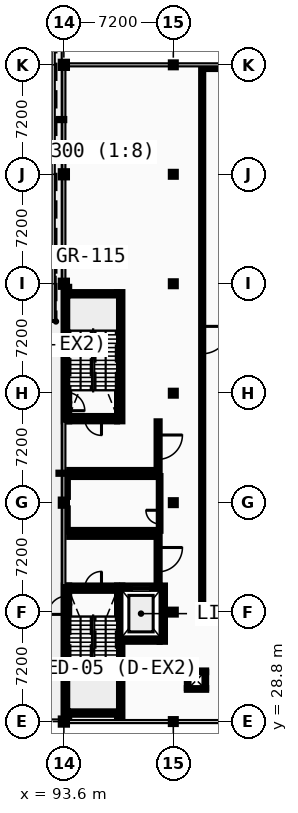
"""IFC4 building model, lengths in metres.
Left out: names, types, materials, properties, quantities, classifications, styles, units other than length and angle.
Written with IfcOpenShell. Run it as: python <this file> out.ifc"""

import sys

from ifc_helpers import new_model, si_unit, direction, frame, frame_2d, origin, origin_2d, place, context, subcontext, project, spatial, rectangle, hollow_circle, extrude, element, fill, save


model = new_model("IFC4")
c1 = context("Model", 3, precision=1e-05, world=origin(), true_north=direction((0.0, 1.0)))
c2 = subcontext(c1, "Body", "Model", "MODEL_VIEW")
j1 = project(units=[si_unit("LENGTHUNIT", "METRE"), si_unit("PLANEANGLEUNIT", "RADIAN")], contexts=[c1])
p1 = place(None, origin())
s1 = spatial("IfcSite", under=j1, at=p1, CompositionType="ELEMENT")
p2 = place(p1, origin())
s2 = spatial("IfcBuilding", under=s1, at=p2, CompositionType="ELEMENT")
p3 = place(p2, origin())
s3 = spatial("IfcBuildingStorey", under=s2, at=p3, CompositionType="ELEMENT", Elevation=0.0)
for number, where, z_axis, x_axis in (
    (1, (93.6, 28.8, 0.0), (0.0, 0.0, 1.0), (1.0, 0.0, 0.0)),
    (2, (93.6, 43.2, 0.0), (0.0, 0.0, 1.0), (1.0, 0.0, 0.0)),
    (3, (93.6, 57.6, 0.0), (0.0, 0.0, 1.0), (1.0, 0.0, 0.0)),
    (4, (93.6, 64.8, 0.0), (0.0, 0.0, 1.0), (1.0, 0.0, 0.0)),
    (5, (93.6, 72.0, 0.0), (0.0, 0.0, 1.0), (1.0, 0.0, 0.0)),
):
    element("IfcColumn", number, at=place(p3, frame(where, z_axis=z_axis, x_axis=x_axis)), inside=s3, PredefinedType="COLUMN", context=c2, shape_type="SweptSolid", body=[
        extrude(hollow_circle(Radius=0.203, WallThickness=0.016, at=origin_2d()), origin(), (0.0, 0.0, 1.0), 5.2),
    ])
for number, where, z_axis, x_axis in (
    (6, (100.8, 28.8, 0.0), (0.0, 0.0, 1.0), (1.0, 0.0, 0.0)),
    (7, (100.8, 36.0, 0.0), (0.0, 0.0, 1.0), (1.0, 0.0, 0.0)),
    (8, (100.8, 43.2, 0.0), (0.0, 0.0, 1.0), (1.0, 0.0, 0.0)),
    (9, (100.8, 50.4, 0.0), (0.0, 0.0, 1.0), (1.0, 0.0, 0.0)),
    (10, (100.8, 57.6, 0.0), (0.0, 0.0, 1.0), (1.0, 0.0, 0.0)),
    (11, (100.8, 64.8, 0.0), (0.0, 0.0, 1.0), (1.0, 0.0, 0.0)),
    (12, (100.8, 72.0, 0.0), (0.0, 0.0, 1.0), (1.0, 0.0, 0.0)),
):
    element("IfcColumn", number, at=place(p3, frame(where, z_axis=z_axis, x_axis=x_axis)), inside=s3, PredefinedType="COLUMN", context=c2, shape_type="SweptSolid", body=[
        extrude(hollow_circle(Radius=0.162, WallThickness=0.012, at=origin_2d()), origin(), (0.0, 0.0, 1.0), 5.2),
    ])
p4 = place(p3, frame((93.95, 29.425, 0.0), z_axis=(0.0, 0.0, 1.0), x_axis=(1.0, 0.0, 0.0)))
e13 = element("IfcWall", 13, at=p4, inside=s3, PredefinedType="SHEAR", context=c2, shape_type="SweptSolid", body=[
    extrude(rectangle(XDim=3.15, YDim=0.35, at=frame_2d((1.575, 0.0))), origin(), (0.0, 0.0, 1.0), 4.97),
])
p5 = place(p3, frame((93.95, 37.575, 0.0), z_axis=(0.0, 0.0, 1.0), x_axis=(1.0, 0.0, 0.0)))
e14 = element("IfcWall", 14, at=p5, inside=s3, PredefinedType="SHEAR", context=c2, shape_type="SweptSolid", body=[
    extrude(rectangle(XDim=3.15, YDim=0.35, at=frame_2d((1.575, 0.0))), origin(), (0.0, 0.0, 1.0), 4.97),
])
p6 = place(p5, frame((1.025, 0.0, 0.0)))
e15 = element("IfcOpeningElement", 15, at=p6, cuts=e14, PredefinedType="OPENING", context=c2, shape_type="SweptSolid", body=[
    extrude(rectangle(XDim=1.1, YDim=2.15, at=frame_2d((0.55, 1.075))), frame((0.0, 0.185, 0.0), z_axis=(0.0, -1.0, 0.0), x_axis=(1.0, 0.0, 0.0)), (0.0, 0.0, 1.0), 0.37),
])
p7 = place(p3, frame((93.775, 29.0, 0.0), z_axis=(0.0, 0.0, 1.0), x_axis=(0.0, 1.0, 0.0)))
e16 = element("IfcWall", 16, at=p7, inside=s3, PredefinedType="SHEAR", context=c2, shape_type="SweptSolid", body=[
    extrude(rectangle(XDim=8.75, YDim=0.35, at=frame_2d((4.375, 0.0))), origin(), (0.0, 0.0, 1.0), 4.97),
])
p8 = place(p7, frame((6.85, 0.0, 0.0)))
e17 = element("IfcOpeningElement", 17, at=p8, cuts=e16, PredefinedType="OPENING", context=c2, shape_type="SweptSolid", body=[
    extrude(rectangle(XDim=1.2, YDim=2.15, at=frame_2d((0.6, 1.075))), frame((0.0, 0.185, 0.0), z_axis=(0.0, -1.0, 0.0), x_axis=(1.0, 0.0, 0.0)), (0.0, 0.0, 1.0), 0.37),
])
p9 = place(p3, frame((97.275, 29.0, 0.0), z_axis=(0.0, 0.0, 1.0), x_axis=(0.0, 1.0, 0.0)))
e18 = element("IfcWall", 18, at=p9, inside=s3, PredefinedType="SHEAR", context=c2, shape_type="SweptSolid", body=[
    extrude(rectangle(XDim=8.75, YDim=0.35, at=frame_2d((4.375, 0.0))), origin(), (0.0, 0.0, 1.0), 4.97),
])
p10 = place(p3, frame((97.45, 34.225, 0.0), z_axis=(0.0, 0.0, 1.0), x_axis=(1.0, 0.0, 0.0)))
e19 = element("IfcWall", 19, at=p10, inside=s3, PredefinedType="SHEAR", context=c2, shape_type="SweptSolid", body=[
    extrude(rectangle(XDim=2.45, YDim=0.35, at=frame_2d((1.225, 0.0))), origin(), (0.0, 0.0, 1.0), 4.97),
])
p11 = place(p3, frame((97.45, 37.575, 0.0), z_axis=(0.0, 0.0, 1.0), x_axis=(1.0, 0.0, 0.0)))
e20 = element("IfcWall", 20, at=p11, inside=s3, PredefinedType="SHEAR", context=c2, shape_type="SweptSolid", body=[
    extrude(rectangle(XDim=2.45, YDim=0.35, at=frame_2d((1.225, 0.0))), origin(), (0.0, 0.0, 1.0), 4.97),
])
p12 = place(p11, frame((0.625, 0.0, 0.0)))
e21 = element("IfcOpeningElement", 21, at=p12, cuts=e20, PredefinedType="OPENING", context=c2, shape_type="SweptSolid", body=[
    extrude(rectangle(XDim=1.2, YDim=2.2, at=frame_2d((0.6, 1.1))), frame((0.0, 0.185, 0.0), z_axis=(0.0, -1.0, 0.0), x_axis=(1.0, 0.0, 0.0)), (0.0, 0.0, 1.0), 0.37),
])
p13 = place(p3, frame((100.075, 34.05, 0.0), z_axis=(0.0, 0.0, 1.0), x_axis=(0.0, 1.0, 0.0)))
e22 = element("IfcWall", 22, at=p13, inside=s3, PredefinedType="SHEAR", context=c2, shape_type="SweptSolid", body=[
    extrude(rectangle(XDim=3.7, YDim=0.35, at=frame_2d((1.85, 0.0))), origin(), (0.0, 0.0, 1.0), 4.97),
])
p14 = place(p3, frame((99.8, 37.75, 0.0), z_axis=(0.0, 0.0, 1.0), x_axis=(0.0, 1.0, 0.0)))
e23 = element("IfcWall", 23, at=p14, inside=s3, PredefinedType="PARTITIONING", context=c2, shape_type="SweptSolid", body=[
    extrude(rectangle(XDim=3.4, YDim=0.2, at=frame_2d((1.7, 0.0))), origin(), (0.0, 0.0, 1.0), 4.97),
])
p15 = place(p14, frame((0.9, 0.0, 0.0)))
e24 = element("IfcOpeningElement", 24, at=p15, cuts=e23, PredefinedType="OPENING", context=c2, shape_type="SweptSolid", body=[
    extrude(rectangle(XDim=1.6, YDim=2.2, at=frame_2d((0.8, 1.1))), frame((0.0, 0.11, 0.0), z_axis=(0.0, -1.0, 0.0), x_axis=(1.0, 0.0, 0.0)), (0.0, 0.0, 1.0), 0.22),
])
p16 = place(p3, frame((93.95, 41.05, 0.0), z_axis=(0.0, 0.0, 1.0), x_axis=(1.0, 0.0, 0.0)))
e25 = element("IfcWall", 25, at=p16, inside=s3, PredefinedType="PARTITIONING", context=c2, shape_type="SweptSolid", body=[
    extrude(rectangle(XDim=5.75, YDim=0.2, at=frame_2d((2.875, 0.0))), origin(), (0.0, 0.0, 1.0), 4.97),
])
p17 = place(p3, frame((93.95, 48.725, 0.0), z_axis=(0.0, 0.0, 1.0), x_axis=(1.0, 0.0, 0.0)))
e26 = element("IfcWall", 26, at=p17, inside=s3, PredefinedType="SHEAR", context=c2, shape_type="SweptSolid", body=[
    extrude(rectangle(XDim=3.15, YDim=0.35, at=frame_2d((1.575, 0.0))), origin(), (0.0, 0.0, 1.0), 4.97),
])
p18 = place(p17, frame((1.025, 0.0, 0.0)))
e27 = element("IfcOpeningElement", 27, at=p18, cuts=e26, PredefinedType="OPENING", context=c2, shape_type="SweptSolid", body=[
    extrude(rectangle(XDim=1.1, YDim=2.15, at=frame_2d((0.55, 1.075))), frame((0.0, 0.185, 0.0), z_axis=(0.0, -1.0, 0.0), x_axis=(1.0, 0.0, 0.0)), (0.0, 0.0, 1.0), 0.37),
])
p19 = place(p3, frame((93.95, 56.875, 0.0), z_axis=(0.0, 0.0, 1.0), x_axis=(1.0, 0.0, 0.0)))
e28 = element("IfcWall", 28, at=p19, inside=s3, PredefinedType="SHEAR", context=c2, shape_type="SweptSolid", body=[
    extrude(rectangle(XDim=3.15, YDim=0.35, at=frame_2d((1.575, 0.0))), origin(), (0.0, 0.0, 1.0), 4.97),
])
p20 = place(p3, frame((93.775, 48.55, 0.0), z_axis=(0.0, 0.0, 1.0), x_axis=(0.0, 1.0, 0.0)))
e29 = element("IfcWall", 29, at=p20, inside=s3, PredefinedType="SHEAR", context=c2, shape_type="SweptSolid", body=[
    extrude(rectangle(XDim=8.847, YDim=0.35, at=frame_2d((4.423, 0.0))), origin(), (0.0, 0.0, 1.0), 4.97),
])
p21 = place(p20, frame((0.7, 0.0, 0.0)))
e30 = element("IfcOpeningElement", 30, at=p21, cuts=e29, PredefinedType="OPENING", context=c2, shape_type="SweptSolid", body=[
    extrude(rectangle(XDim=1.2, YDim=2.15, at=frame_2d((0.6, 1.075))), frame((0.0, 0.185, 0.0), z_axis=(0.0, -1.0, 0.0), x_axis=(1.0, 0.0, 0.0)), (0.0, 0.0, 1.0), 0.37),
])
p22 = place(p3, frame((97.275, 48.55, 0.0), z_axis=(0.0, 0.0, 1.0), x_axis=(0.0, 1.0, 0.0)))
e31 = element("IfcWall", 31, at=p22, inside=s3, PredefinedType="SHEAR", context=c2, shape_type="SweptSolid", body=[
    extrude(rectangle(XDim=8.5, YDim=0.35, at=frame_2d((4.25, 0.0))), origin(), (0.0, 0.0, 1.0), 4.97),
])
p23 = place(p3, frame((99.8, 45.15, 0.0), z_axis=(0.0, 0.0, 1.0), x_axis=(0.0, 1.0, 0.0)))
e32 = element("IfcWall", 32, at=p23, inside=s3, PredefinedType="PARTITIONING", context=c2, shape_type="SweptSolid", body=[
    extrude(rectangle(XDim=3.4, YDim=0.2, at=frame_2d((1.7, 0.0))), origin(), (0.0, 0.0, 1.0), 4.97),
])
p24 = place(p23, frame((0.9, 0.0, 0.0)))
e33 = element("IfcOpeningElement", 33, at=p24, cuts=e32, PredefinedType="OPENING", context=c2, shape_type="SweptSolid", body=[
    extrude(rectangle(XDim=1.6, YDim=2.2, at=frame_2d((0.8, 1.1))), frame((0.0, 0.11, 0.0), z_axis=(0.0, -1.0, 0.0), x_axis=(1.0, 0.0, 0.0)), (0.0, 0.0, 1.0), 0.22),
])
p25 = place(p3, frame((93.95, 45.25, 0.0), z_axis=(0.0, 0.0, 1.0), x_axis=(1.0, 0.0, 0.0)))
e34 = element("IfcWall", 34, at=p25, inside=s3, PredefinedType="PARTITIONING", context=c2, shape_type="SweptSolid", body=[
    extrude(rectangle(XDim=5.75, YDim=0.2, at=frame_2d((2.875, 0.0))), origin(), (0.0, 0.0, 1.0), 4.97),
])
for number, where, z_axis, x_axis in (
    (35, (101.69, 30.945, 0.0), (0.0, 0.0, 1.0), (1.0, 0.0, 0.0)),
    (36, (101.69, 32.105, 0.0), (0.0, 0.0, 1.0), (1.0, 0.0, 0.0)),
):
    element("IfcWall", number, at=place(p3, frame(where, z_axis=z_axis, x_axis=x_axis)), inside=s3, PredefinedType="PARTITIONING", context=c2, shape_type="SweptSolid", body=[
        extrude(rectangle(XDim=1.27, YDim=0.11, at=frame_2d((0.635, 0.0))), origin(), (0.0, 0.0, 1.0), 4.97),
    ])
for number, where, z_axis, x_axis in (
    (37, (101.745, 31.0, 0.0), (0.0, 0.0, 1.0), (0.0, 1.0, 0.0)),
    (38, (102.905, 31.0, 0.0), (0.0, 0.0, 1.0), (0.0, 1.0, 0.0)),
):
    element("IfcWall", number, at=place(p3, frame(where, z_axis=z_axis, x_axis=x_axis)), inside=s3, PredefinedType="PARTITIONING", context=c2, shape_type="SweptSolid", body=[
        extrude(rectangle(XDim=1.05, YDim=0.11, at=frame_2d((0.525, 0.0))), origin(), (0.0, 0.0, 1.0), 4.97),
    ])
p26 = place(p3, frame((102.7, 36.0, 0.0), z_axis=(0.0, 0.0, 1.0), x_axis=(1.0, 0.0, 0.0)))
e39 = element("IfcWall", 39, at=p26, inside=s3, PredefinedType="PARTITIONING", context=c2, shape_type="SweptSolid", body=[
    extrude(rectangle(XDim=4.92, YDim=0.135, at=frame_2d((2.46, 0.0))), origin(), (0.0, 0.0, 1.0), 4.665),
])
p27 = place(p3, frame((93.8, 41.35, 0.0), z_axis=(0.0, 0.0, 1.0), x_axis=(1.0, 0.0, 0.0)))
e40 = element("IfcWall", 40, at=p27, inside=s3, PredefinedType="PARTITIONING", context=c2, shape_type="SweptSolid", body=[
    extrude(rectangle(XDim=5.88, YDim=0.11, at=frame_2d((2.94, 0.0))), origin(), (0.0, 0.0, 1.0), 4.97),
])
p28 = place(p3, frame((93.8, 44.95, 0.0), z_axis=(0.0, 0.0, 1.0), x_axis=(1.0, 0.0, 0.0)))
e41 = element("IfcWall", 41, at=p28, inside=s3, PredefinedType="PARTITIONING", context=c2, shape_type="SweptSolid", body=[
    extrude(rectangle(XDim=5.88, YDim=0.125, at=frame_2d((2.94, 0.0))), origin(), (0.0, 0.0, 1.0), 4.97),
])
p29 = place(p3, frame((102.7, 71.8, 0.0), z_axis=(0.0, 0.0, 1.0), x_axis=(1.0, 0.0, 0.0)))
e42 = element("IfcWall", 42, at=p29, inside=s3, PredefinedType="PARTITIONING", context=c2, shape_type="SweptSolid", body=[
    extrude(rectangle(XDim=4.92, YDim=0.15, at=frame_2d((2.46, 0.0))), origin(), (0.0, 0.0, 1.0), 4.665),
])
p30 = place(p3, frame((93.8, 41.405, 0.0), z_axis=(0.0, 0.0, 1.0), x_axis=(0.0, 1.0, 0.0)))
e43 = element("IfcWall", 43, at=p30, inside=s3, PredefinedType="PARTITIONING", context=c2, shape_type="SweptSolid", body=[
    extrude(rectangle(XDim=1.415, YDim=0.11, at=frame_2d((0.708, 0.0))), origin(), (0.0, 0.0, 1.0), 4.97),
])
p31 = place(p3, frame((93.8, 43.58, 0.0), z_axis=(0.0, 0.0, 1.0), x_axis=(0.0, 1.0, 0.0)))
e44 = element("IfcWall", 44, at=p31, inside=s3, PredefinedType="PARTITIONING", context=c2, shape_type="SweptSolid", body=[
    extrude(rectangle(XDim=1.307, YDim=0.125, at=frame_2d((0.654, 0.0))), origin(), (0.0, 0.0, 1.0), 4.97),
])
p32 = place(p3, frame((99.9, 41.35, 0.0), z_axis=(0.0, 0.0, 1.0), x_axis=(0.0, 1.0, 0.0)))
e45 = element("IfcWall", 45, at=p32, inside=s3, PredefinedType="PARTITIONING", context=c2, shape_type="SweptSolid", body=[
    extrude(rectangle(XDim=3.6, YDim=0.11, at=frame_2d((1.8, 0.0))), origin(), (0.0, 0.0, 1.0), 4.97),
])
p33 = place(p32, frame((0.45, 0.0, 0.0)))
e46 = element("IfcOpeningElement", 46, at=p33, cuts=e45, PredefinedType="OPENING", context=c2, shape_type="SweptSolid", body=[
    extrude(rectangle(XDim=0.9, YDim=2.1, at=frame_2d((0.45, 1.05))), frame((0.0, 0.065, 0.0), z_axis=(0.0, -1.0, 0.0), x_axis=(1.0, 0.0, 0.0)), (0.0, 0.0, 1.0), 0.13),
])
p34 = place(p3, frame((102.7, 36.067, 0.0), z_axis=(0.0, 0.0, 1.0), x_axis=(0.0, 1.0, 0.0)))
e47 = element("IfcWall", 47, at=p34, inside=s3, PredefinedType="PARTITIONING", context=c2, shape_type="SweptSolid", body=[
    extrude(rectangle(XDim=35.658, YDim=0.135, at=frame_2d((17.829, 0.0))), origin(), (0.0, 0.0, 1.0), 4.97),
])
p35 = place(p34, frame((16.929, 0.0, 0.0)))
e48 = element("IfcOpeningElement", 48, at=p35, cuts=e47, PredefinedType="OPENING", context=c2, shape_type="SweptSolid", body=[
    extrude(rectangle(XDim=1.8, YDim=2.3, at=frame_2d((0.9, 1.15))), frame((0.0, 0.078, 0.0), z_axis=(0.0, -1.0, 0.0), x_axis=(1.0, 0.0, 0.0)), (0.0, 0.0, 1.0), 0.155),
])
p36 = place(p6, frame((1.1, 0.0, 0.0), z_axis=(0.0, 0.0, 1.0), x_axis=(-1.0, 0.0, 0.0)))
e49 = element("IfcDoor", 49, at=p36, inside=s3, OperationType="SINGLE_SWING_RIGHT", PredefinedType="DOOR", context=c2, shape_type="SweptSolid", body=[
    extrude(rectangle(XDim=1.1, YDim=2.15, at=frame_2d((0.55, 1.075))), frame((0.0, 0.025, 0.0), z_axis=(0.0, -1.0, 0.0), x_axis=(1.0, 0.0, 0.0)), (0.0, 0.0, 1.0), 0.05),
])
fill(e15, e49)
p37 = place(p8, origin())
e50 = element("IfcDoor", 50, at=p37, inside=s3, OperationType="SINGLE_SWING_LEFT", PredefinedType="DOOR", context=c2, shape_type="SweptSolid", body=[
    extrude(rectangle(XDim=1.2, YDim=2.15, at=frame_2d((0.6, 1.075))), frame((0.0, 0.025, 0.0), z_axis=(0.0, -1.0, 0.0), x_axis=(1.0, 0.0, 0.0)), (0.0, 0.0, 1.0), 0.05),
])
fill(e17, e50)
p38 = place(p12, origin())
e51 = element("IfcDoor", 51, at=p38, inside=s3, OperationType="SLIDING_TO_RIGHT", PredefinedType="DOOR", context=c2, shape_type="SweptSolid", body=[
    extrude(rectangle(XDim=1.2, YDim=2.2, at=frame_2d((0.6, 1.1))), frame((0.0, 0.025, 0.0), z_axis=(0.0, -1.0, 0.0), x_axis=(1.0, 0.0, 0.0)), (0.0, 0.0, 1.0), 0.05),
])
fill(e21, e51)
p39 = place(p15, origin())
e52 = element("IfcDoor", 52, at=p39, inside=s3, OperationType="DOUBLE_DOOR_SINGLE_SWING", PredefinedType="DOOR", context=c2, shape_type="SweptSolid", body=[
    extrude(rectangle(XDim=1.6, YDim=2.2, at=frame_2d((0.8, 1.1))), frame((0.0, 0.025, 0.0), z_axis=(0.0, -1.0, 0.0), x_axis=(1.0, 0.0, 0.0)), (0.0, 0.0, 1.0), 0.05),
])
fill(e24, e52)
p40 = place(p18, origin())
e53 = element("IfcDoor", 53, at=p40, inside=s3, OperationType="SINGLE_SWING_RIGHT", PredefinedType="DOOR", context=c2, shape_type="SweptSolid", body=[
    extrude(rectangle(XDim=1.1, YDim=2.15, at=frame_2d((0.55, 1.075))), frame((0.0, 0.025, 0.0), z_axis=(0.0, -1.0, 0.0), x_axis=(1.0, 0.0, 0.0)), (0.0, 0.0, 1.0), 0.05),
])
fill(e27, e53)
p41 = place(p21, frame((1.2, 0.0, 0.0), z_axis=(0.0, 0.0, 1.0), x_axis=(-1.0, 0.0, 0.0)))
e54 = element("IfcDoor", 54, at=p41, inside=s3, OperationType="SINGLE_SWING_LEFT", PredefinedType="DOOR", context=c2, shape_type="SweptSolid", body=[
    extrude(rectangle(XDim=1.2, YDim=2.15, at=frame_2d((0.6, 1.075))), frame((0.0, 0.025, 0.0), z_axis=(0.0, -1.0, 0.0), x_axis=(1.0, 0.0, 0.0)), (0.0, 0.0, 1.0), 0.05),
])
fill(e30, e54)
p42 = place(p24, origin())
e55 = element("IfcDoor", 55, at=p42, inside=s3, OperationType="DOUBLE_DOOR_SINGLE_SWING", PredefinedType="DOOR", context=c2, shape_type="SweptSolid", body=[
    extrude(rectangle(XDim=1.6, YDim=2.2, at=frame_2d((0.8, 1.1))), frame((0.0, 0.025, 0.0), z_axis=(0.0, -1.0, 0.0), x_axis=(1.0, 0.0, 0.0)), (0.0, 0.0, 1.0), 0.05),
])
fill(e33, e55)
p43 = place(p35, origin())
e56 = element("IfcDoor", 56, at=p43, inside=s3, OperationType="DOUBLE_DOOR_SINGLE_SWING", PredefinedType="DOOR", context=c2, shape_type="SweptSolid", body=[
    extrude(rectangle(XDim=1.8, YDim=2.3, at=frame_2d((0.9, 1.15))), frame((0.0, 0.025, 0.0), z_axis=(0.0, -1.0, 0.0), x_axis=(1.0, 0.0, 0.0)), (0.0, 0.0, 1.0), 0.05),
])
fill(e48, e56)
p44 = place(p33, frame((0.9, 0.0, 0.0), z_axis=(0.0, 0.0, 1.0), x_axis=(-1.0, 0.0, 0.0)))
e57 = element("IfcDoor", 57, at=p44, inside=s3, OperationType="SINGLE_SWING_RIGHT", PredefinedType="DOOR", context=c2, shape_type="SweptSolid", body=[
    extrude(rectangle(XDim=0.9, YDim=2.1, at=frame_2d((0.45, 1.05))), frame((0.0, 0.025, 0.0), z_axis=(0.0, -1.0, 0.0), x_axis=(1.0, 0.0, 0.0)), (0.0, 0.0, 1.0), 0.05),
])
fill(e46, e57)
save(model, sys.argv[1])
